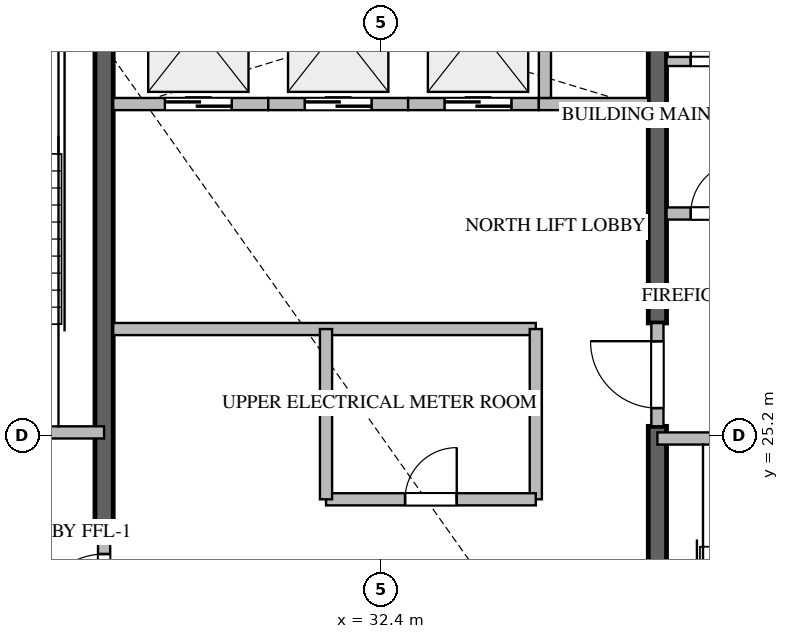
"""IFC4 building model, lengths in metres.
Left out: names, types, materials, properties, quantities, classifications, styles, units other than length and angle.
Written with IfcOpenShell. Run it as: python <this file> out.ifc"""

import sys

from ifc_helpers import new_model, si_unit, direction, frame, frame_2d, origin, place, context, subcontext, project, spatial, rectangle, extrude, source, transform, mapped, element, fill, save


model = new_model("IFC4")
c1 = context("Model", 3, precision=1e-05, world=origin(), true_north=direction((0.0, 1.0)))
c2 = subcontext(c1, "Body", "Model", "MODEL_VIEW")
j1 = project(units=[si_unit("LENGTHUNIT", "METRE"), si_unit("PLANEANGLEUNIT", "RADIAN")], contexts=[c1])
p1 = place(None, origin())
s1 = spatial("IfcSite", under=j1, at=p1, CompositionType="ELEMENT")
p2 = place(p1, origin())
s2 = spatial("IfcBuilding", under=s1, at=p2, CompositionType="ELEMENT")
p3 = place(p2, frame((0.0, 0.0, 241.25)))
s3 = spatial("IfcBuildingStorey", under=s2, at=p3, CompositionType="ELEMENT", Elevation=241.25)
p4 = place(p3, frame((27.85, 23.55, -0.26), z_axis=(0.0, 0.0, 1.0), x_axis=(0.0, 1.0, 0.0)))
e1 = element("IfcWall", 1, at=p4, inside=s3, PredefinedType="SHEAR", context=c2, shape_type="SweptSolid", body=[
    extrude(rectangle(XDim=9.875, YDim=0.3, at=frame_2d((4.938, 0.0))), origin(), (0.0, 0.0, 1.0), 3.848),
])
p5 = place(p3, frame((36.95, 16.975, -0.26), z_axis=(0.0, 0.0, 1.0), x_axis=(0.0, 1.0, 0.0)))
e2 = element("IfcWall", 2, at=p5, inside=s3, PredefinedType="SHEAR", context=c2, shape_type="SweptSolid", body=[
    extrude(rectangle(XDim=8.375, YDim=0.3, at=frame_2d((4.188, 0.0))), origin(), (0.0, 0.0, 1.0), 3.848),
])
p6 = place(p3, frame((36.95, 27.05, -0.26), z_axis=(0.0, 0.0, 1.0), x_axis=(0.0, 1.0, 0.0)))
e3 = element("IfcWall", 3, at=p6, inside=s3, PredefinedType="SHEAR", context=c2, shape_type="SweptSolid", body=[
    extrude(rectangle(XDim=6.375, YDim=0.3, at=frame_2d((3.188, 0.0))), origin(), (0.0, 0.0, 1.0), 3.848),
])
p7 = place(p3, frame((23.4, 25.25, 0.0), z_axis=(0.0, 0.0, 1.0), x_axis=(1.0, 0.0, 0.0)))
e4 = element("IfcWall", 4, at=p7, inside=s3, PredefinedType="STANDARD", context=c2, shape_type="SweptSolid", body=[
    extrude(rectangle(XDim=4.45, YDim=0.2, at=frame_2d((2.225, 0.0))), origin(), (0.0, 0.0, 1.0), 3.59),
])
p8 = place(p7, frame((1.65, 0.0, 0.0)))
e5 = element("IfcOpeningElement", 5, at=p8, cuts=e4, PredefinedType="OPENING", context=c2, shape_type="SweptSolid", body=[
    extrude(rectangle(XDim=1.1, YDim=2.15, at=frame_2d((0.55, 1.075))), frame((0.0, 0.11, 0.0), z_axis=(0.0, -1.0, 0.0), x_axis=(1.0, 0.0, 0.0)), (0.0, 0.0, 1.0), 0.22),
])
p9 = place(p3, frame((36.95, 25.15, 0.0), z_axis=(0.0, 0.0, 1.0), x_axis=(1.0, 0.0, 0.0)))
e6 = element("IfcWall", 6, at=p9, inside=s3, PredefinedType="STANDARD", context=c2, shape_type="SweptSolid", body=[
    extrude(rectangle(XDim=4.45, YDim=0.2, at=frame_2d((2.225, 0.0))), origin(), (0.0, 0.0, 1.0), 3.59),
])
p10 = place(p9, frame((1.65, 0.0, 0.0)))
e7 = element("IfcOpeningElement", 7, at=p10, cuts=e6, PredefinedType="OPENING", context=c2, shape_type="SweptSolid", body=[
    extrude(rectangle(XDim=1.1, YDim=2.15, at=frame_2d((0.55, 1.075))), frame((0.0, 0.11, 0.0), z_axis=(0.0, -1.0, 0.0), x_axis=(1.0, 0.0, 0.0)), (0.0, 0.0, 1.0), 0.22),
])
p11 = place(p3, frame((28.0, 30.65, 0.0), z_axis=(0.0, 0.0, 1.0), x_axis=(1.0, 0.0, 0.0)))
e8 = element("IfcWall", 8, at=p11, inside=s3, PredefinedType="STANDARD", context=c2, shape_type="SweptSolid", body=[
    extrude(rectangle(XDim=2.55, YDim=0.2, at=frame_2d((1.275, 0.0))), origin(), (0.0, 0.0, 1.0), 3.59),
])
p12 = place(p11, frame((0.85, 0.0, 0.0)))
e9 = element("IfcOpeningElement", 9, at=p12, cuts=e8, PredefinedType="OPENING", context=c2, shape_type="SweptSolid", body=[
    extrude(rectangle(XDim=1.1, YDim=2.2, at=frame_2d((0.55, 1.1))), frame((0.0, 0.11, 0.0), z_axis=(0.0, -1.0, 0.0), x_axis=(1.0, 0.0, 0.0)), (0.0, 0.0, 1.0), 0.22),
])
p13 = place(p3, frame((30.55, 30.65, 0.0), z_axis=(0.0, 0.0, 1.0), x_axis=(1.0, 0.0, 0.0)))
e10 = element("IfcWall", 10, at=p13, inside=s3, PredefinedType="STANDARD", context=c2, shape_type="SweptSolid", body=[
    extrude(rectangle(XDim=2.3, YDim=0.2, at=frame_2d((1.15, 0.0))), origin(), (0.0, 0.0, 1.0), 3.59),
])
p14 = place(p13, frame((0.6, 0.0, 0.0)))
e11 = element("IfcOpeningElement", 11, at=p14, cuts=e10, PredefinedType="OPENING", context=c2, shape_type="SweptSolid", body=[
    extrude(rectangle(XDim=1.1, YDim=2.2, at=frame_2d((0.55, 1.1))), frame((0.0, 0.11, 0.0), z_axis=(0.0, -1.0, 0.0), x_axis=(1.0, 0.0, 0.0)), (0.0, 0.0, 1.0), 0.22),
])
p15 = place(p3, frame((32.85, 30.65, 0.0), z_axis=(0.0, 0.0, 1.0), x_axis=(1.0, 0.0, 0.0)))
e12 = element("IfcWall", 12, at=p15, inside=s3, PredefinedType="STANDARD", context=c2, shape_type="SweptSolid", body=[
    extrude(rectangle(XDim=2.15, YDim=0.2, at=frame_2d((1.075, 0.0))), origin(), (0.0, 0.0, 1.0), 3.59),
])
p16 = place(p15, frame((0.6, 0.0, 0.0)))
e13 = element("IfcOpeningElement", 13, at=p16, cuts=e12, PredefinedType="OPENING", context=c2, shape_type="SweptSolid", body=[
    extrude(rectangle(XDim=1.1, YDim=2.2, at=frame_2d((0.55, 1.1))), frame((0.0, 0.11, 0.0), z_axis=(0.0, -1.0, 0.0), x_axis=(1.0, 0.0, 0.0)), (0.0, 0.0, 1.0), 0.22),
])
p17 = place(p3, frame((35.0, 30.65, 0.0), z_axis=(0.0, 0.0, 1.0), x_axis=(1.0, 0.0, 0.0)))
e14 = element("IfcWall", 14, at=p17, inside=s3, PredefinedType="STANDARD", context=c2, shape_type="SweptSolid", body=[
    extrude(rectangle(XDim=1.8, YDim=0.2, at=frame_2d((0.9, 0.0))), origin(), (0.0, 0.0, 1.0), 3.59),
])
p18 = place(p3, frame((35.1, 30.75, 0.0), z_axis=(0.0, 0.0, 1.0), x_axis=(0.0, 1.0, 0.0)))
e15 = element("IfcWall", 15, at=p18, inside=s3, PredefinedType="STANDARD", context=c2, shape_type="SweptSolid", body=[
    extrude(rectangle(XDim=2.675, YDim=0.2, at=frame_2d((1.337, 0.0))), origin(), (0.0, 0.0, 1.0), 3.59),
])
p19 = place(p3, frame((37.1, 28.85, 0.0), z_axis=(0.0, 0.0, 1.0), x_axis=(1.0, 0.0, 0.0)))
e16 = element("IfcWall", 16, at=p19, inside=s3, PredefinedType="STANDARD", context=c2, shape_type="SweptSolid", body=[
    extrude(rectangle(XDim=1.648, YDim=0.2, at=frame_2d((0.824, 0.0))), origin(), (0.0, 0.0, 1.0), 3.59),
])
p20 = place(p19, frame((0.399, 0.0, 0.0)))
e17 = element("IfcOpeningElement", 17, at=p20, cuts=e16, PredefinedType="OPENING", context=c2, shape_type="SweptSolid", body=[
    extrude(rectangle(XDim=0.85, YDim=2.1, at=frame_2d((0.425, 1.05))), frame((0.0, 0.11, 0.0), z_axis=(0.0, -1.0, 0.0), x_axis=(1.0, 0.0, 0.0)), (0.0, 0.0, 1.0), 0.22),
])
p21 = place(p3, frame((27.85, 21.852, 0.0), z_axis=(0.0, 0.0, 1.0), x_axis=(0.0, 1.0, 0.0)))
e18 = element("IfcWall", 18, at=p21, inside=s3, PredefinedType="STANDARD", context=c2, shape_type="SweptSolid", body=[
    extrude(rectangle(XDim=1.696, YDim=0.2, at=frame_2d((0.848, 0.0))), origin(), (0.0, 0.0, 1.0), 3.59),
])
p22 = place(p21, frame((0.298, 0.0, 0.0)))
e19 = element("IfcOpeningElement", 19, at=p22, cuts=e18, PredefinedType="OPENING", context=c2, shape_type="SweptSolid", body=[
    extrude(rectangle(XDim=1.1, YDim=2.15, at=frame_2d((0.55, 1.075))), frame((0.0, 0.11, 0.0), z_axis=(0.0, -1.0, 0.0), x_axis=(1.0, 0.0, 0.0)), (0.0, 0.0, 1.0), 0.22),
])
p23 = place(p3, frame((36.95, 25.352, 0.0), z_axis=(0.0, 0.0, 1.0), x_axis=(0.0, 1.0, 0.0)))
e20 = element("IfcWall", 20, at=p23, inside=s3, PredefinedType="STANDARD", context=c2, shape_type="SweptSolid", body=[
    extrude(rectangle(XDim=1.696, YDim=0.2, at=frame_2d((0.848, 0.0))), origin(), (0.0, 0.0, 1.0), 3.59),
])
p24 = place(p23, frame((0.298, 0.0, 0.0)))
e21 = element("IfcOpeningElement", 21, at=p24, cuts=e20, PredefinedType="OPENING", context=c2, shape_type="SweptSolid", body=[
    extrude(rectangle(XDim=1.1, YDim=2.15, at=frame_2d((0.55, 1.075))), frame((0.0, 0.11, 0.0), z_axis=(0.0, -1.0, 0.0), x_axis=(1.0, 0.0, 0.0)), (0.0, 0.0, 1.0), 0.22),
])
p25 = place(p3, frame((37.1, 31.35, 0.0), z_axis=(0.0, 0.0, 1.0), x_axis=(1.0, 0.0, 0.0)))
e22 = element("IfcWall", 22, at=p25, inside=s3, PredefinedType="PARTITIONING", context=c2, shape_type="SweptSolid", body=[
    extrude(rectangle(XDim=1.648, YDim=0.15, at=frame_2d((0.824, 0.0))), origin(), (0.0, 0.0, 1.0), 3.59),
])
p26 = place(p25, frame((0.399, 0.0, 0.0)))
e23 = element("IfcOpeningElement", 23, at=p26, cuts=e22, PredefinedType="OPENING", context=c2, shape_type="SweptSolid", body=[
    extrude(rectangle(XDim=0.85, YDim=2.1, at=frame_2d((0.425, 1.05))), frame((0.0, 0.085, 0.0), z_axis=(0.0, -1.0, 0.0), x_axis=(1.0, 0.0, 0.0)), (0.0, 0.0, 1.0), 0.17),
])
p27 = place(p3, frame((28.0, 26.95, 0.0), z_axis=(0.0, 0.0, 1.0), x_axis=(1.0, 0.0, 0.0)))
e24 = element("IfcWall", 24, at=p27, inside=s3, PredefinedType="STANDARD", context=c2, shape_type="SweptSolid", body=[
    extrude(rectangle(XDim=6.95, YDim=0.2, at=frame_2d((3.475, 0.0))), origin(), (0.0, 0.0, 1.0), 3.59),
])
p28 = place(p3, frame((34.95, 24.15, 0.0), z_axis=(0.0, 0.0, 1.0), x_axis=(0.0, 1.0, 0.0)))
e25 = element("IfcWall", 25, at=p28, inside=s3, PredefinedType="STANDARD", context=c2, shape_type="SweptSolid", body=[
    extrude(rectangle(XDim=2.8, YDim=0.2, at=frame_2d((1.4, 0.0))), origin(), (0.0, 0.0, 1.0), 3.59),
])
p29 = place(p3, frame((31.5, 24.15, 0.0), z_axis=(0.0, 0.0, 1.0), x_axis=(1.0, 0.0, 0.0)))
e26 = element("IfcWall", 26, at=p29, inside=s3, PredefinedType="STANDARD", context=c2, shape_type="SweptSolid", body=[
    extrude(rectangle(XDim=3.45, YDim=0.2, at=frame_2d((1.725, 0.0))), origin(), (0.0, 0.0, 1.0), 3.59),
])
p30 = place(p29, frame((1.3, 0.0, 0.0)))
e27 = element("IfcOpeningElement", 27, at=p30, cuts=e26, PredefinedType="OPENING", context=c2, shape_type="SweptSolid", body=[
    extrude(rectangle(XDim=0.85, YDim=2.1, at=frame_2d((0.425, 1.05))), frame((0.0, 0.11, 0.0), z_axis=(0.0, -1.0, 0.0), x_axis=(1.0, 0.0, 0.0)), (0.0, 0.0, 1.0), 0.22),
])
p31 = place(p3, frame((31.5, 24.15, 0.0), z_axis=(0.0, 0.0, 1.0), x_axis=(0.0, 1.0, 0.0)))
e28 = element("IfcWall", 28, at=p31, inside=s3, PredefinedType="STANDARD", context=c2, shape_type="SweptSolid", body=[
    extrude(rectangle(XDim=2.8, YDim=0.2, at=frame_2d((1.4, 0.0))), origin(), (0.0, 0.0, 1.0), 3.59),
])
m1 = source(origin(), c2, "Body", "SweptSolid", [
    extrude(rectangle(XDim=1.1, YDim=2.2, at=frame_2d((0.55, 1.1))), frame((0.0, 0.025, 0.0), z_axis=(0.0, -1.0, 0.0), x_axis=(1.0, 0.0, 0.0)), (0.0, 0.0, 1.0), 0.05),
])
p32 = place(p12, origin())
e29 = element("IfcDoor", 29, at=p32, inside=s3, OperationType="DOUBLE_DOOR_SLIDING", PredefinedType="DOOR", context=c2, shape_type="MappedRepresentation", body=[
    mapped(m1, transform((0.0, 0.0, 0.0), scale=1.0)),
])
fill(e9, e29)
p33 = place(p14, origin())
e30 = element("IfcDoor", 30, at=p33, inside=s3, OperationType="DOUBLE_DOOR_SLIDING", PredefinedType="DOOR", context=c2, shape_type="MappedRepresentation", body=[
    mapped(m1, transform((0.0, 0.0, 0.0), scale=1.0)),
])
fill(e11, e30)
p34 = place(p16, origin())
e31 = element("IfcDoor", 31, at=p34, inside=s3, OperationType="DOUBLE_DOOR_SLIDING", PredefinedType="DOOR", context=c2, shape_type="MappedRepresentation", body=[
    mapped(m1, transform((0.0, 0.0, 0.0), scale=1.0)),
])
fill(e13, e31)
m2 = source(origin(), c2, "Body", "SweptSolid", [
    extrude(rectangle(XDim=0.85, YDim=2.1, at=frame_2d((0.425, 1.05))), frame((0.0, 0.025, 0.0), z_axis=(0.0, -1.0, 0.0), x_axis=(1.0, 0.0, 0.0)), (0.0, 0.0, 1.0), 0.05),
])
p35 = place(p20, origin())
e32 = element("IfcDoor", 32, at=p35, inside=s3, OperationType="SINGLE_SWING_RIGHT", PredefinedType="DOOR", context=c2, shape_type="MappedRepresentation", body=[
    mapped(m2, transform((0.0, 0.0, 0.0), scale=1.0)),
])
fill(e17, e32)
m3 = source(origin(), c2, "Body", "SweptSolid", [
    extrude(rectangle(XDim=1.1, YDim=2.15, at=frame_2d((0.55, 1.075))), frame((0.0, 0.025, 0.0), z_axis=(0.0, -1.0, 0.0), x_axis=(1.0, 0.0, 0.0)), (0.0, 0.0, 1.0), 0.05),
])
p36 = place(p22, origin())
e33 = element("IfcDoor", 33, at=p36, inside=s3, OperationType="SINGLE_SWING_LEFT", PredefinedType="DOOR", context=c2, shape_type="MappedRepresentation", body=[
    mapped(m3, transform((0.0, 0.0, 0.0), scale=1.0)),
])
fill(e19, e33)
p37 = place(p24, origin())
e34 = element("IfcDoor", 34, at=p37, inside=s3, OperationType="SINGLE_SWING_RIGHT", PredefinedType="DOOR", context=c2, shape_type="MappedRepresentation", body=[
    mapped(m3, transform((0.0, 0.0, 0.0), scale=1.0)),
])
fill(e21, e34)
p38 = place(p26, origin())
e35 = element("IfcDoor", 35, at=p38, inside=s3, OperationType="SINGLE_SWING_LEFT", PredefinedType="DOOR", context=c2, shape_type="MappedRepresentation", body=[
    mapped(m2, transform((0.0, 0.0, 0.0), scale=1.0)),
])
fill(e23, e35)
p39 = place(p30, origin())
e36 = element("IfcDoor", 36, at=p39, inside=s3, OperationType="SINGLE_SWING_RIGHT", PredefinedType="DOOR", context=c2, shape_type="MappedRepresentation", body=[
    mapped(m2, transform((0.0, 0.0, 0.0), scale=1.0)),
])
fill(e27, e36)
save(model, sys.argv[1])
